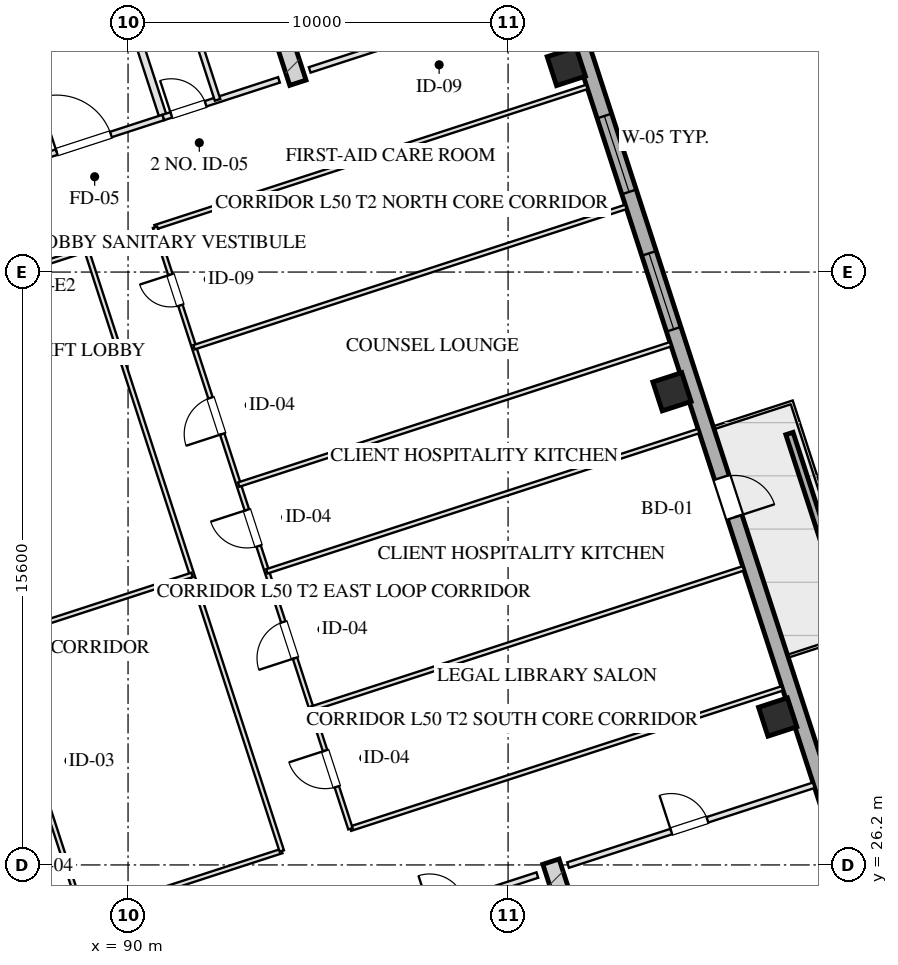
"""IFC4 building model, lengths in metres.
Left out: names, types, materials, properties, quantities, classifications, styles, units other than length and angle.
Written with IfcOpenShell. Run it as: python <this file> out.ifc"""

import sys

from ifc_helpers import new_model, si_unit, direction, frame, frame_2d, origin, origin_2d, place, context, subcontext, project, spatial, rectangle, hollow_rectangle, extrude, element, fill, save


model = new_model("IFC4")
c1 = context("Model", 3, precision=1e-05, world=origin(), true_north=direction((0.0, 1.0)))
c2 = subcontext(c1, "Body", "Model", "MODEL_VIEW")
j1 = project(units=[si_unit("LENGTHUNIT", "METRE"), si_unit("PLANEANGLEUNIT", "RADIAN")], contexts=[c1])
p1 = place(None, origin())
s1 = spatial("IfcSite", under=j1, at=p1, CompositionType="ELEMENT")
p2 = place(p1, origin())
s2 = spatial("IfcBuilding", under=s1, at=p2, CompositionType="ELEMENT")
p3 = place(p2, frame((0.0, 0.0, 188.6)))
s3 = spatial("IfcBuildingStorey", under=s2, at=p3, CompositionType="ELEMENT", Elevation=188.6)
for number, where, z_axis, x_axis in (
    (1, (101.128, 26.286, 0.0), (0.0, 0.0, 1.0), (0.309, -0.951, 0.0)),
    (2, (94.469, 46.781, 0.0), (0.0, 0.0, 1.0), (-0.309, 0.951, 0.0)),
):
    element("IfcWall", number, at=place(p3, frame(where, z_axis=z_axis, x_axis=x_axis)), inside=s3, PredefinedType="SHEAR", context=c2, shape_type="SweptSolid", body=[
        extrude(rectangle(XDim=9.33, YDim=0.45, at=frame_2d((4.665, 0.0))), origin(), (0.0, 0.0, 1.0), 3.45),
    ])
for number, where, z_axis, x_axis in (
    (3, (107.094, 30.091, 0.0), (0.0, 0.0, 1.0), (0.951, 0.309, 0.0)),
    (4, (104.313, 38.651, 0.0), (0.0, 0.0, 1.0), (0.951, 0.309, 0.0)),
    (5, (101.532, 47.21, 0.0), (0.0, 0.0, 1.0), (0.951, 0.309, 0.0)),
):
    element("IfcColumn", number, at=place(p3, frame(where, z_axis=z_axis, x_axis=x_axis)), inside=s3, PredefinedType="COLUMN", context=c2, shape_type="SweptSolid", body=[
        extrude(hollow_rectangle(XDim=0.8, YDim=0.8, WallThickness=0.028, at=origin_2d()), origin(), (0.0, 0.0, 1.0), 3.451),
    ])
p4 = place(p3, frame((98.224, 59.173, 0.0), z_axis=(0.0, 0.0, 1.0), x_axis=(0.309014228706, -0.951057414911, 0.0)))
e6 = element("IfcWall", 6, at=p4, inside=s3, PredefinedType="SOLIDWALL", context=c2, shape_type="SweptSolid", body=[
    extrude(rectangle(XDim=42.8, YDim=0.4, at=frame_2d((21.4, 0.0))), origin(), (0.0, 0.0, 1.0), 2.61),
])
p5 = place(p4, frame((17.75, 0.0, 0.75)))
e7 = element("IfcOpeningElement", 7, at=p5, cuts=e6, PredefinedType="OPENING", context=c2, shape_type="SweptSolid", body=[
    extrude(rectangle(XDim=2.1, YDim=1.46, at=frame_2d((1.05, 0.73))), frame((0.0, 0.21, 0.0), z_axis=(0.0, -1.0, 0.0), x_axis=(1.0, 0.0, 0.0)), (0.0, 0.0, 1.0), 0.42),
])
p6 = place(p4, frame((13.95, 0.0, 0.75)))
e8 = element("IfcOpeningElement", 8, at=p6, cuts=e6, PredefinedType="OPENING", context=c2, shape_type="SweptSolid", body=[
    extrude(rectangle(XDim=2.1, YDim=1.46, at=frame_2d((1.05, 0.73))), frame((0.0, 0.21, 0.0), z_axis=(0.0, -1.0, 0.0), x_axis=(1.0, 0.0, 0.0)), (0.0, 0.0, 1.0), 0.42),
])
p7 = place(p4, frame((23.95, 0.0, 0.0)))
e9 = element("IfcOpeningElement", 9, at=p7, cuts=e6, PredefinedType="OPENING", context=c2, shape_type="SweptSolid", body=[
    extrude(rectangle(XDim=1.1, YDim=2.15, at=frame_2d((0.55, 1.075))), frame((0.0, 0.21, 0.0), z_axis=(0.0, -1.0, 0.0), x_axis=(1.0, 0.0, 0.0)), (0.0, 0.0, 1.0), 0.42),
])
p8 = place(p3, frame((108.887, 32.987, 0.0), z_axis=(0.0, 0.0, 1.0), x_axis=(-0.30900096172, 0.951061725471, 0.0)))
e10 = element("IfcWall", 10, at=p8, inside=s3, PredefinedType="PARAPET", context=c2, shape_type="SweptSolid", body=[
    extrude(rectangle(XDim=4.8, YDim=0.2, at=frame_2d((2.4, 0.0))), origin(), (0.0, 0.0, 1.0), 0.75),
])
p9 = place(p3, frame((97.727, 24.944, 0.0), z_axis=(0.0, 0.0, 1.0), x_axis=(0.951036872128, 0.309077446369, 0.0)))
e11 = element("IfcWall", 11, at=p9, inside=s3, PredefinedType="PARTITIONING", context=c2, shape_type="SweptSolid", body=[
    extrude(rectangle(XDim=3.2, YDim=0.15, at=frame_2d((1.6, 0.0))), origin(), (0.0, 0.0, 1.0), 3.175),
])
p10 = place(p9, frame((0.22, 0.0, 0.0)))
e12 = element("IfcOpeningElement", 12, at=p10, cuts=e11, PredefinedType="OPENING", context=c2, shape_type="SweptSolid", body=[
    extrude(rectangle(XDim=0.95, YDim=2.05, at=frame_2d((0.475, 1.025))), frame((0.0, 0.085, 0.0), z_axis=(0.0, -1.0, 0.0), x_axis=(1.0, 0.0, 0.0)), (0.0, 0.0, 1.0), 0.17),
])
p11 = place(p3, frame((90.928, 45.868, 0.0), z_axis=(0.0, 0.0, 1.0), x_axis=(-0.309042196757, 0.951048327176, 0.0)))
e13 = element("IfcWall", 13, at=p11, inside=s3, PredefinedType="PARTITIONING", context=c2, shape_type="SweptSolid", body=[
    extrude(rectangle(XDim=8.43, YDim=0.2, at=frame_2d((4.215, 0.0))), origin(), (0.0, 0.0, 1.0), 3.175),
])
p12 = place(p3, frame((86.743, 44.508, 0.0), z_axis=(0.0, 0.0, 1.0), x_axis=(0.951063829732, 0.308994485023, 0.0)))
e14 = element("IfcWall", 14, at=p12, inside=s3, PredefinedType="PARTITIONING", context=c2, shape_type="SweptSolid", body=[
    extrude(rectangle(XDim=4.4, YDim=0.15, at=frame_2d((2.2, 0.0))), origin(), (0.0, 0.0, 1.0), 3.175),
])
p13 = place(p12, frame((1.45, 0.0, 0.0)))
e15 = element("IfcOpeningElement", 15, at=p13, cuts=e14, PredefinedType="OPENING", context=c2, shape_type="SweptSolid", body=[
    extrude(rectangle(XDim=1.5, YDim=2.05, at=frame_2d((0.75, 1.025))), frame((0.0, 0.085, 0.0), z_axis=(0.0, -1.0, 0.0), x_axis=(1.0, 0.0, 0.0)), (0.0, 0.0, 1.0), 0.17),
])
p14 = place(p3, frame((85.718, 47.666, 0.0), z_axis=(0.0, 0.0, 1.0), x_axis=(0.951058531764, 0.30901079133, 0.0)))
e16 = element("IfcWall", 16, at=p14, inside=s3, PredefinedType="PARTITIONING", context=c2, shape_type="SweptSolid", body=[
    extrude(rectangle(XDim=4.4, YDim=0.2, at=frame_2d((2.2, 0.0))), origin(), (0.0, 0.0, 1.0), 3.175),
])
p15 = place(p14, frame((0.45, 0.0, 0.0)))
e17 = element("IfcOpeningElement", 17, at=p15, cuts=e16, PredefinedType="OPENING", context=c2, shape_type="SweptSolid", body=[
    extrude(rectangle(XDim=1.1, YDim=2.05, at=frame_2d((0.55, 1.025))), frame((0.0, 0.11, 0.0), z_axis=(0.0, -1.0, 0.0), x_axis=(1.0, 0.0, 0.0)), (0.0, 0.0, 1.0), 0.22),
])
p16 = place(p14, frame((2.55, 0.0, 0.0)))
e18 = element("IfcOpeningElement", 18, at=p16, cuts=e16, PredefinedType="OPENING", context=c2, shape_type="SweptSolid", body=[
    extrude(rectangle(XDim=1.1, YDim=2.05, at=frame_2d((0.55, 1.025))), frame((0.0, 0.11, 0.0), z_axis=(0.0, -1.0, 0.0), x_axis=(1.0, 0.0, 0.0)), (0.0, 0.0, 1.0), 0.22),
])
p17 = place(p3, frame((90.928, 45.868, 0.0), z_axis=(0.0, 0.0, 1.0), x_axis=(0.951059297078, 0.309008435874, 0.0)))
e19 = element("IfcWall", 19, at=p17, inside=s3, PredefinedType="PARTITIONING", context=c2, shape_type="SweptSolid", body=[
    extrude(rectangle(XDim=3.2, YDim=0.15, at=frame_2d((1.6, 0.0))), origin(), (0.0, 0.0, 1.0), 3.175),
])
p18 = place(p17, frame((0.22, 0.0, 0.0)))
e20 = element("IfcOpeningElement", 20, at=p18, cuts=e19, PredefinedType="OPENING", context=c2, shape_type="SweptSolid", body=[
    extrude(rectangle(XDim=0.95, YDim=2.05, at=frame_2d((0.475, 1.025))), frame((0.0, 0.085, 0.0), z_axis=(0.0, -1.0, 0.0), x_axis=(1.0, 0.0, 0.0)), (0.0, 0.0, 1.0), 0.17),
])
p19 = place(p3, frame((92.355, 46.331, 0.0), z_axis=(0.0, 0.0, 1.0), x_axis=(-0.309007490203, 0.951059604335, 0.0)))
e21 = element("IfcWall", 21, at=p19, inside=s3, PredefinedType="PARTITIONING", context=c2, shape_type="SweptSolid", body=[
    extrude(rectangle(XDim=8.43, YDim=0.15, at=frame_2d((4.215, 0.0))), origin(), (0.0, 0.0, 1.0), 3.175),
])
p20 = place(p19, frame((2.55, 0.0, 0.0)))
e22 = element("IfcOpeningElement", 22, at=p20, cuts=e21, PredefinedType="OPENING", context=c2, shape_type="SweptSolid", body=[
    extrude(rectangle(XDim=0.95, YDim=2.05, at=frame_2d((0.475, 1.025))), frame((0.0, 0.085, 0.0), z_axis=(0.0, -1.0, 0.0), x_axis=(1.0, 0.0, 0.0)), (0.0, 0.0, 1.0), 0.17),
])
p21 = place(p19, frame((4.7, 0.0, 0.0)))
e23 = element("IfcOpeningElement", 23, at=p21, cuts=e21, PredefinedType="OPENING", context=c2, shape_type="SweptSolid", body=[
    extrude(rectangle(XDim=0.9, YDim=2.05, at=frame_2d((0.45, 1.025))), frame((0.0, 0.085, 0.0), z_axis=(0.0, -1.0, 0.0), x_axis=(1.0, 0.0, 0.0)), (0.0, 0.0, 1.0), 0.17),
])
p22 = place(p19, frame((6.8, 0.0, 0.0)))
e24 = element("IfcOpeningElement", 24, at=p22, cuts=e21, PredefinedType="OPENING", context=c2, shape_type="SweptSolid", body=[
    extrude(rectangle(XDim=0.9, YDim=2.05, at=frame_2d((0.45, 1.025))), frame((0.0, 0.085, 0.0), z_axis=(0.0, -1.0, 0.0), x_axis=(1.0, 0.0, 0.0)), (0.0, 0.0, 1.0), 0.17),
])
p23 = place(p3, frame((101.578, 26.196, 0.0), z_axis=(0.0, 0.0, 1.0), x_axis=(0.951064934653, 0.308991084134, 0.0)))
e25 = element("IfcWall", 25, at=p23, inside=s3, PredefinedType="PARTITIONING", context=c2, shape_type="SweptSolid", body=[
    extrude(rectangle(XDim=6.8, YDim=0.15, at=frame_2d((3.4, 0.0))), origin(), (0.0, 0.0, 1.0), 3.175),
])
p24 = place(p23, frame((2.856, 0.0, 0.0)))
e26 = element("IfcOpeningElement", 26, at=p24, cuts=e25, PredefinedType="OPENING", context=c2, shape_type="SweptSolid", body=[
    extrude(rectangle(XDim=1.0, YDim=2.05, at=frame_2d((0.5, 1.025))), frame((0.0, 0.085, 0.0), z_axis=(0.0, -1.0, 0.0), x_axis=(1.0, 0.0, 0.0)), (0.0, 0.0, 1.0), 0.17),
])
p25 = place(p3, frame((94.78, 47.119, 0.0), z_axis=(0.0, 0.0, 1.0), x_axis=(0.951057811516, 0.309013008068, 0.0)))
e27 = element("IfcWall", 27, at=p25, inside=s3, PredefinedType="PARTITIONING", context=c2, shape_type="SweptSolid", body=[
    extrude(rectangle(XDim=6.8, YDim=0.15, at=frame_2d((3.4, 0.0))), origin(), (0.0, 0.0, 1.0), 3.175),
])
p26 = place(p25, frame((2.856, 0.0, 0.0)))
e28 = element("IfcOpeningElement", 28, at=p26, cuts=e27, PredefinedType="OPENING", context=c2, shape_type="SweptSolid", body=[
    extrude(rectangle(XDim=0.85, YDim=2.05, at=frame_2d((0.425, 1.025))), frame((0.0, 0.085, 0.0), z_axis=(0.0, -1.0, 0.0), x_axis=(1.0, 0.0, 0.0)), (0.0, 0.0, 1.0), 0.17),
])
p27 = place(p3, frame((88.814, 24.867, 0.0), z_axis=(0.0, 0.0, 1.0), x_axis=(0.951061793147, 0.309000753423, 0.0)))
e29 = element("IfcWall", 29, at=p27, inside=s3, PredefinedType="PARTITIONING", context=c2, shape_type="SweptSolid", body=[
    extrude(rectangle(XDim=5.5, YDim=0.12, at=frame_2d((2.75, 0.0))), origin(), (0.0, 0.0, 1.0), 3.175),
])
p28 = place(p3, frame((95.852, 27.153, 0.0), z_axis=(0.0, 0.0, 1.0), x_axis=(0.951054485045, 0.30902324585, 0.0)))
e30 = element("IfcWall", 30, at=p28, inside=s3, PredefinedType="PARTITIONING", context=c2, shape_type="SweptSolid", body=[
    extrude(rectangle(XDim=11.95, YDim=0.12, at=frame_2d((5.975, 0.0))), origin(), (0.0, 0.0, 1.0), 3.175),
])
p29 = place(p3, frame((83.672, 40.692, 0.0), z_axis=(0.0, 0.0, 1.0), x_axis=(0.951048747115, 0.30904090443, 0.0)))
e31 = element("IfcWall", 31, at=p29, inside=s3, PredefinedType="PARTITIONING", context=c2, shape_type="SweptSolid", body=[
    extrude(rectangle(XDim=5.5, YDim=0.12, at=frame_2d((2.75, 0.0))), origin(), (0.0, 0.0, 1.0), 3.175),
])
p30 = place(p3, frame((90.71, 42.979, 0.0), z_axis=(0.0, 0.0, 1.0), x_axis=(0.95105853842, 0.309010770845, 0.0)))
e32 = element("IfcWall", 32, at=p30, inside=s3, PredefinedType="PARTITIONING", context=c2, shape_type="SweptSolid", body=[
    extrude(rectangle(XDim=11.95, YDim=0.12, at=frame_2d((5.975, 0.0))), origin(), (0.0, 0.0, 1.0), 3.175),
])
p31 = place(p3, frame((88.814, 24.867, 0.0), z_axis=(0.0, 0.0, 1.0), x_axis=(-0.309022042254, 0.951054876125, 0.0)))
e33 = element("IfcWall", 33, at=p31, inside=s3, PredefinedType="PARTITIONING", context=c2, shape_type="SweptSolid", body=[
    extrude(rectangle(XDim=16.64, YDim=0.12, at=frame_2d((8.32, 0.0))), origin(), (0.0, 0.0, 1.0), 3.175),
])
p32 = place(p31, frame((3.438, 0.0, 0.0)))
e34 = element("IfcOpeningElement", 34, at=p32, cuts=e33, PredefinedType="OPENING", context=c2, shape_type="SweptSolid", body=[
    extrude(rectangle(XDim=1.1, YDim=2.05, at=frame_2d((0.55, 1.025))), frame((0.0, 0.07, 0.0), z_axis=(0.0, -1.0, 0.0), x_axis=(1.0, 0.0, 0.0)), (0.0, 0.0, 1.0), 0.14),
])
p33 = place(p31, frame((11.69, 0.0, 0.0)))
e35 = element("IfcOpeningElement", 35, at=p33, cuts=e33, PredefinedType="OPENING", context=c2, shape_type="SweptSolid", body=[
    extrude(rectangle(XDim=1.1, YDim=2.05, at=frame_2d((0.55, 1.025))), frame((0.0, 0.07, 0.0), z_axis=(0.0, -1.0, 0.0), x_axis=(1.0, 0.0, 0.0)), (0.0, 0.0, 1.0), 0.14),
])
p34 = place(p3, frame((94.045, 26.566, 0.0), z_axis=(0.0, 0.0, 1.0), x_axis=(-0.30901773025, 0.951056277195, 0.0)))
e36 = element("IfcWall", 36, at=p34, inside=s3, PredefinedType="PARTITIONING", context=c2, shape_type="SweptSolid", body=[
    extrude(rectangle(XDim=16.64, YDim=0.12, at=frame_2d((8.32, 0.0))), origin(), (0.0, 0.0, 1.0), 3.175),
])
p35 = place(p3, frame((95.852, 27.153, 0.0), z_axis=(0.0, 0.0, 1.0), x_axis=(-0.309004459387, 0.951060589068, 0.0)))
e37 = element("IfcWall", 37, at=p35, inside=s3, PredefinedType="PARTITIONING", context=c2, shape_type="SweptSolid", body=[
    extrude(rectangle(XDim=16.64, YDim=0.12, at=frame_2d((8.32, 0.0))), origin(), (0.0, 0.0, 1.0), 3.175),
])
p36 = place(p35, frame((1.16, 0.0, 0.0)))
e38 = element("IfcOpeningElement", 38, at=p36, cuts=e37, PredefinedType="OPENING", context=c2, shape_type="SweptSolid", body=[
    extrude(rectangle(XDim=1.0, YDim=2.05, at=frame_2d((0.5, 1.025))), frame((0.0, 0.07, 0.0), z_axis=(0.0, -1.0, 0.0), x_axis=(1.0, 0.0, 0.0)), (0.0, 0.0, 1.0), 0.14),
])
p37 = place(p35, frame((4.72, 0.0, 0.0)))
e39 = element("IfcOpeningElement", 39, at=p37, cuts=e37, PredefinedType="OPENING", context=c2, shape_type="SweptSolid", body=[
    extrude(rectangle(XDim=1.0, YDim=2.05, at=frame_2d((0.5, 1.025))), frame((0.0, 0.07, 0.0), z_axis=(0.0, -1.0, 0.0), x_axis=(1.0, 0.0, 0.0)), (0.0, 0.0, 1.0), 0.14),
])
p38 = place(p35, frame((7.82, 0.0, 0.0)))
e40 = element("IfcOpeningElement", 40, at=p38, cuts=e37, PredefinedType="OPENING", context=c2, shape_type="SweptSolid", body=[
    extrude(rectangle(XDim=1.0, YDim=2.05, at=frame_2d((0.5, 1.025))), frame((0.0, 0.07, 0.0), z_axis=(0.0, -1.0, 0.0), x_axis=(1.0, 0.0, 0.0)), (0.0, 0.0, 1.0), 0.14),
])
p39 = place(p35, frame((10.92, 0.0, 0.0)))
e41 = element("IfcOpeningElement", 41, at=p39, cuts=e37, PredefinedType="OPENING", context=c2, shape_type="SweptSolid", body=[
    extrude(rectangle(XDim=1.0, YDim=2.05, at=frame_2d((0.5, 1.025))), frame((0.0, 0.07, 0.0), z_axis=(0.0, -1.0, 0.0), x_axis=(1.0, 0.0, 0.0)), (0.0, 0.0, 1.0), 0.14),
])
p40 = place(p35, frame((14.48, 0.0, 0.0)))
e42 = element("IfcOpeningElement", 42, at=p40, cuts=e37, PredefinedType="OPENING", context=c2, shape_type="SweptSolid", body=[
    extrude(rectangle(XDim=0.85, YDim=2.05, at=frame_2d((0.425, 1.025))), frame((0.0, 0.07, 0.0), z_axis=(0.0, -1.0, 0.0), x_axis=(1.0, 0.0, 0.0)), (0.0, 0.0, 1.0), 0.14),
])
p41 = place(p3, frame((86.453, 32.133, 0.0), z_axis=(0.0, 0.0, 1.0), x_axis=(0.951052986339, 0.309027858251, 0.0)))
e43 = element("IfcWall", 43, at=p41, inside=s3, PredefinedType="PARTITIONING", context=c2, shape_type="SweptSolid", body=[
    extrude(rectangle(XDim=5.5, YDim=0.12, at=frame_2d((2.75, 0.0))), origin(), (0.0, 0.0, 1.0), 3.175),
])
for number, where, z_axis, x_axis in (
    (44, (94.826, 30.311, 0.0), (0.0, 0.0, 1.0), (0.951, 0.309, 0.0)),
    (45, (93.652, 33.925, 0.0), (0.0, 0.0, 1.0), (0.951, 0.309, 0.0)),
):
    element("IfcWall", number, at=place(p3, frame(where, z_axis=z_axis, x_axis=x_axis)), inside=s3, PredefinedType="PARTITIONING", context=c2, shape_type="SweptSolid", body=[
        extrude(rectangle(XDim=11.95, YDim=0.12, at=frame_2d((5.975, 0.0))), origin(), (0.0, 0.0, 1.0), 3.175),
    ])
for number, where, z_axis, x_axis in (
    (46, (92.91, 36.207, 0.0), (0.0, 0.0, 1.0), (0.951, 0.309, 0.0)),
    (47, (91.736, 39.821, 0.0), (0.0, 0.0, 1.0), (0.951, 0.309, 0.0)),
):
    element("IfcWall", number, at=place(p3, frame(where, z_axis=z_axis, x_axis=x_axis)), inside=s3, PredefinedType="PARTITIONING", context=c2, shape_type="SweptSolid", body=[
        extrude(rectangle(XDim=11.95, YDim=0.12, at=frame_2d((5.975, 0.0))), origin(), (0.0, 0.0, 1.0), 3.175),
    ])
p42 = place(p5, origin())
e48 = element("IfcWindow", 48, at=p42, inside=s3, PartitioningType="TRIPLE_PANEL_VERTICAL", PredefinedType="WINDOW", context=c2, shape_type="SweptSolid", body=[
    extrude(rectangle(XDim=2.1, YDim=1.46, at=frame_2d((1.05, 0.73))), frame((0.0, 0.03, 0.0), z_axis=(0.0, -1.0, 0.0), x_axis=(1.0, 0.0, 0.0)), (0.0, 0.0, 1.0), 0.06),
])
fill(e7, e48)
p43 = place(p6, origin())
e49 = element("IfcWindow", 49, at=p43, inside=s3, PartitioningType="TRIPLE_PANEL_VERTICAL", PredefinedType="WINDOW", context=c2, shape_type="SweptSolid", body=[
    extrude(rectangle(XDim=2.1, YDim=1.46, at=frame_2d((1.05, 0.73))), frame((0.0, 0.03, 0.0), z_axis=(0.0, -1.0, 0.0), x_axis=(1.0, 0.0, 0.0)), (0.0, 0.0, 1.0), 0.06),
])
fill(e8, e49)
p44 = place(p7, origin())
e50 = element("IfcDoor", 50, at=p44, inside=s3, OperationType="SINGLE_SWING_RIGHT", PredefinedType="DOOR", context=c2, shape_type="SweptSolid", body=[
    extrude(rectangle(XDim=1.1, YDim=2.15, at=frame_2d((0.55, 1.075))), frame((0.0, 0.025, 0.0), z_axis=(0.0, -1.0, 0.0), x_axis=(1.0, 0.0, 0.0)), (0.0, 0.0, 1.0), 0.05),
])
fill(e9, e50)
p45 = place(p13, origin())
e51 = element("IfcDoor", 51, at=p45, inside=s3, OperationType="SINGLE_SWING_LEFT", PredefinedType="DOOR", context=c2, shape_type="SweptSolid", body=[
    extrude(rectangle(XDim=1.5, YDim=2.05, at=frame_2d((0.75, 1.025))), frame((0.0, 0.025, 0.0), z_axis=(0.0, -1.0, 0.0), x_axis=(1.0, 0.0, 0.0)), (0.0, 0.0, 1.0), 0.05),
])
fill(e15, e51)
p46 = place(p18, origin())
e52 = element("IfcDoor", 52, at=p46, inside=s3, OperationType="SINGLE_SWING_LEFT", PredefinedType="DOOR", context=c2, shape_type="SweptSolid", body=[
    extrude(rectangle(XDim=0.95, YDim=2.05, at=frame_2d((0.475, 1.025))), frame((0.0, 0.025, 0.0), z_axis=(0.0, -1.0, 0.0), x_axis=(1.0, 0.0, 0.0)), (0.0, 0.0, 1.0), 0.05),
])
fill(e20, e52)
p47 = place(p24, origin())
e53 = element("IfcDoor", 53, at=p47, inside=s3, OperationType="SINGLE_SWING_LEFT", PredefinedType="DOOR", context=c2, shape_type="SweptSolid", body=[
    extrude(rectangle(XDim=1.0, YDim=2.05, at=frame_2d((0.5, 1.025))), frame((0.0, 0.025, 0.0), z_axis=(0.0, -1.0, 0.0), x_axis=(1.0, 0.0, 0.0)), (0.0, 0.0, 1.0), 0.05),
])
fill(e26, e53)
p48 = place(p36, origin())
e54 = element("IfcDoor", 54, at=p48, inside=s3, OperationType="SINGLE_SWING_RIGHT", PredefinedType="DOOR", context=c2, shape_type="SweptSolid", body=[
    extrude(rectangle(XDim=1.0, YDim=2.05, at=frame_2d((0.5, 1.025))), frame((0.0, 0.025, 0.0), z_axis=(0.0, -1.0, 0.0), x_axis=(1.0, 0.0, 0.0)), (0.0, 0.0, 1.0), 0.05),
])
fill(e38, e54)
p49 = place(p37, origin())
e55 = element("IfcDoor", 55, at=p49, inside=s3, OperationType="SINGLE_SWING_LEFT", PredefinedType="DOOR", context=c2, shape_type="SweptSolid", body=[
    extrude(rectangle(XDim=1.0, YDim=2.05, at=frame_2d((0.5, 1.025))), frame((0.0, 0.025, 0.0), z_axis=(0.0, -1.0, 0.0), x_axis=(1.0, 0.0, 0.0)), (0.0, 0.0, 1.0), 0.05),
])
fill(e39, e55)
p50 = place(p38, origin())
e56 = element("IfcDoor", 56, at=p50, inside=s3, OperationType="SINGLE_SWING_RIGHT", PredefinedType="DOOR", context=c2, shape_type="SweptSolid", body=[
    extrude(rectangle(XDim=1.0, YDim=2.05, at=frame_2d((0.5, 1.025))), frame((0.0, 0.025, 0.0), z_axis=(0.0, -1.0, 0.0), x_axis=(1.0, 0.0, 0.0)), (0.0, 0.0, 1.0), 0.05),
])
fill(e40, e56)
p51 = place(p39, origin())
e57 = element("IfcDoor", 57, at=p51, inside=s3, OperationType="SINGLE_SWING_LEFT", PredefinedType="DOOR", context=c2, shape_type="SweptSolid", body=[
    extrude(rectangle(XDim=1.0, YDim=2.05, at=frame_2d((0.5, 1.025))), frame((0.0, 0.025, 0.0), z_axis=(0.0, -1.0, 0.0), x_axis=(1.0, 0.0, 0.0)), (0.0, 0.0, 1.0), 0.05),
])
fill(e41, e57)
p52 = place(p40, origin())
e58 = element("IfcDoor", 58, at=p52, inside=s3, OperationType="SINGLE_SWING_RIGHT", PredefinedType="DOOR", context=c2, shape_type="SweptSolid", body=[
    extrude(rectangle(XDim=0.85, YDim=2.05, at=frame_2d((0.425, 1.025))), frame((0.0, 0.025, 0.0), z_axis=(0.0, -1.0, 0.0), x_axis=(1.0, 0.0, 0.0)), (0.0, 0.0, 1.0), 0.05),
])
fill(e42, e58)
save(model, sys.argv[1])
